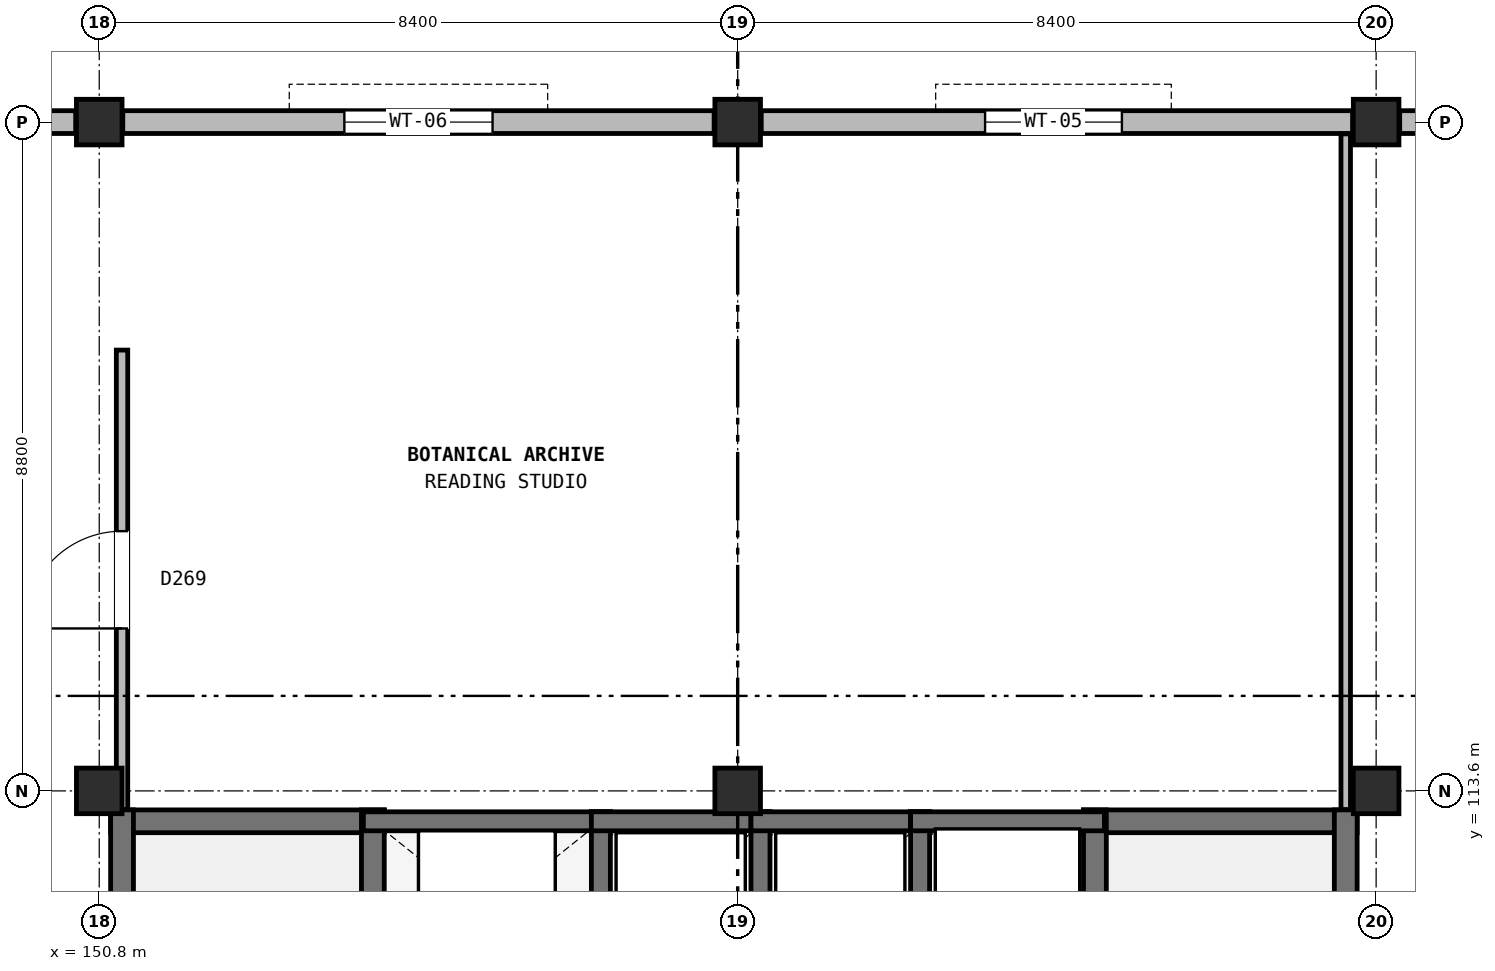
"""IFC4 building model, lengths in metres.
Left out: names, types, materials, properties, quantities, classifications, styles, units other than length and angle.
Written with IfcOpenShell. Run it as: python <this file> out.ifc"""

import sys

from ifc_helpers import new_model, si_unit, direction, frame, frame_2d, origin, origin_2d, place, context, subcontext, project, spatial, rectangle, extrude, element, fill, save


model = new_model("IFC4")
c1 = context("Model", 3, precision=1e-05, world=origin(), true_north=direction((0.0, 1.0)))
c2 = subcontext(c1, "Body", "Model", "MODEL_VIEW")
j1 = project(units=[si_unit("LENGTHUNIT", "METRE"), si_unit("PLANEANGLEUNIT", "RADIAN")], contexts=[c1])
p1 = place(None, origin())
s1 = spatial("IfcSite", under=j1, at=p1, CompositionType="ELEMENT")
p2 = place(p1, origin())
s2 = spatial("IfcBuilding", under=s1, at=p2, CompositionType="ELEMENT")
p3 = place(p2, frame((0.0, 0.0, 52.2)))
s3 = spatial("IfcBuildingStorey", under=s2, at=p3, CompositionType="ELEMENT", Elevation=52.2)
for number, where, z_axis, x_axis in (
    (1, (150.8, 113.6, 0.0), (0.0, 0.0, 1.0), (1.0, 0.0, 0.0)),
    (2, (150.8, 122.4, 0.0), (0.0, 0.0, 1.0), (1.0, 0.0, 0.0)),
    (3, (159.2, 113.6, 0.0), (0.0, 0.0, 1.0), (1.0, 0.0, 0.0)),
    (4, (159.2, 122.4, 0.0), (0.0, 0.0, 1.0), (1.0, 0.0, 0.0)),
    (5, (167.6, 113.6, 0.0), (0.0, 0.0, 1.0), (1.0, 0.0, 0.0)),
    (6, (167.6, 122.4, 0.0), (0.0, 0.0, 1.0), (1.0, 0.0, 0.0)),
):
    element("IfcColumn", number, at=place(p3, frame(where, z_axis=z_axis, x_axis=x_axis)), inside=s3, PredefinedType="COLUMN", context=c2, shape_type="SweptSolid", body=[
        extrude(rectangle(XDim=0.6, YDim=0.6, at=origin_2d()), origin(), (0.0, 0.0, 1.0), 3.8),
    ])
p4 = place(p3, frame((175.69, 122.4, 0.0), z_axis=(0.0, 0.0, 1.0), x_axis=(-1.0, 0.0, 0.0)))
e7 = element("IfcWall", 7, at=p4, inside=s3, PredefinedType="SOLIDWALL", context=c2, shape_type="SweptSolid", body=[
    extrude(rectangle(XDim=7.78, YDim=0.3, at=frame_2d((3.89, 0.0))), origin(), (0.0, 0.0, 1.0), 3.05),
])
p5 = place(p4, frame((1.22, 0.0, 0.9)))
e8 = element("IfcOpeningElement", 8, at=p5, cuts=e7, PredefinedType="OPENING", context=c2, shape_type="SweptSolid", body=[
    extrude(rectangle(XDim=1.65, YDim=1.85, at=frame_2d((0.825, 0.925))), frame((0.0, 0.16, 0.0), z_axis=(0.0, -1.0, 0.0), x_axis=(1.0, 0.0, 0.0)), (0.0, 0.0, 1.0), 0.32),
])
p6 = place(p3, frame((167.29, 122.4, 0.0), z_axis=(0.0, 0.0, 1.0), x_axis=(-1.0, 0.0, 0.0)))
e9 = element("IfcWall", 9, at=p6, inside=s3, PredefinedType="SOLIDWALL", context=c2, shape_type="SweptSolid", body=[
    extrude(rectangle(XDim=7.78, YDim=0.3, at=frame_2d((3.89, 0.0))), origin(), (0.0, 0.0, 1.0), 3.05),
])
p7 = place(p6, frame((3.035, 0.0, 0.9)))
e10 = element("IfcOpeningElement", 10, at=p7, cuts=e9, PredefinedType="OPENING", context=c2, shape_type="SweptSolid", body=[
    extrude(rectangle(XDim=1.8, YDim=1.9, at=frame_2d((0.9, 0.95))), frame((0.0, 0.16, 0.0), z_axis=(0.0, -1.0, 0.0), x_axis=(1.0, 0.0, 0.0)), (0.0, 0.0, 1.0), 0.32),
])
p8 = place(p3, frame((158.89, 122.4, 0.0), z_axis=(0.0, 0.0, 1.0), x_axis=(-1.0, 0.0, 0.0)))
e11 = element("IfcWall", 11, at=p8, inside=s3, PredefinedType="SOLIDWALL", context=c2, shape_type="SweptSolid", body=[
    extrude(rectangle(XDim=7.78, YDim=0.3, at=frame_2d((3.89, 0.0))), origin(), (0.0, 0.0, 1.0), 3.05),
])
p9 = place(p8, frame((2.915, 0.0, 0.9)))
e12 = element("IfcOpeningElement", 12, at=p9, cuts=e11, PredefinedType="OPENING", context=c2, shape_type="SweptSolid", body=[
    extrude(rectangle(XDim=1.95, YDim=1.9, at=frame_2d((0.975, 0.95))), frame((0.0, 0.16, 0.0), z_axis=(0.0, -1.0, 0.0), x_axis=(1.0, 0.0, 0.0)), (0.0, 0.0, 1.0), 0.32),
])
p10 = place(p3, frame((150.49, 122.4, 0.0), z_axis=(0.0, 0.0, 1.0), x_axis=(-1.0, 0.0, 0.0)))
e13 = element("IfcWall", 13, at=p10, inside=s3, PredefinedType="SOLIDWALL", context=c2, shape_type="SweptSolid", body=[
    extrude(rectangle(XDim=7.78, YDim=0.3, at=frame_2d((3.89, 0.0))), origin(), (0.0, 0.0, 1.0), 3.05),
])
p11 = place(p10, frame((2.84, 0.0, 0.9)))
e14 = element("IfcOpeningElement", 14, at=p11, cuts=e13, PredefinedType="OPENING", context=c2, shape_type="SweptSolid", body=[
    extrude(rectangle(XDim=2.1, YDim=1.95, at=frame_2d((1.05, 0.975))), frame((0.0, 0.16, 0.0), z_axis=(0.0, -1.0, 0.0), x_axis=(1.0, 0.0, 0.0)), (0.0, 0.0, 1.0), 0.32),
])
p12 = place(p3, frame((150.95, 113.2, 0.0), z_axis=(0.0, 0.0, 1.0), x_axis=(1.0, 0.0, 0.0)))
e15 = element("IfcWall", 15, at=p12, inside=s3, PredefinedType="SHEAR", context=c2, shape_type="SweptSolid", body=[
    extrude(rectangle(XDim=3.6, YDim=0.3, at=frame_2d((1.8, 0.0))), origin(), (0.0, 0.0, 1.0), 3.8),
])
p13 = place(p3, frame((151.1, 105.05, 0.0), z_axis=(0.0, 0.0, 1.0), x_axis=(0.0, 1.0, 0.0)))
e16 = element("IfcWall", 16, at=p13, inside=s3, PredefinedType="SHEAR", context=c2, shape_type="SweptSolid", body=[
    extrude(rectangle(XDim=8.3, YDim=0.3, at=frame_2d((4.15, 0.0))), origin(), (0.0, 0.0, 1.0), 3.8),
])
p14 = place(p3, frame((154.4, 105.05, 0.0), z_axis=(0.0, 0.0, 1.0), x_axis=(0.0, 1.0, 0.0)))
e17 = element("IfcWall", 17, at=p14, inside=s3, PredefinedType="SHEAR", context=c2, shape_type="SweptSolid", body=[
    extrude(rectangle(XDim=8.3, YDim=0.3, at=frame_2d((4.15, 0.0))), origin(), (0.0, 0.0, 1.0), 3.8),
])
p15 = place(p14, frame((0.45, 0.0, 0.0)))
e18 = element("IfcOpeningElement", 18, at=p15, cuts=e17, PredefinedType="OPENING", context=c2, shape_type="SweptSolid", body=[
    extrude(rectangle(XDim=1.1, YDim=2.2, at=frame_2d((0.55, 1.1))), frame((0.0, 0.16, 0.0), z_axis=(0.0, -1.0, 0.0), x_axis=(1.0, 0.0, 0.0)), (0.0, 0.0, 1.0), 0.32),
])
p16 = place(p3, frame((163.75, 113.2, 0.0), z_axis=(0.0, 0.0, 1.0), x_axis=(1.0, 0.0, 0.0)))
e19 = element("IfcWall", 19, at=p16, inside=s3, PredefinedType="SHEAR", context=c2, shape_type="SweptSolid", body=[
    extrude(rectangle(XDim=3.6, YDim=0.3, at=frame_2d((1.8, 0.0))), origin(), (0.0, 0.0, 1.0), 3.8),
])
for number, where, z_axis, x_axis in (
    (20, (163.9, 105.05, 0.0), (0.0, 0.0, 1.0), (0.0, 1.0, 0.0)),
    (21, (167.2, 105.05, 0.0), (0.0, 0.0, 1.0), (0.0, 1.0, 0.0)),
):
    element("IfcWall", number, at=place(p3, frame(where, z_axis=z_axis, x_axis=x_axis)), inside=s3, PredefinedType="SHEAR", context=c2, shape_type="SweptSolid", body=[
        extrude(rectangle(XDim=8.3, YDim=0.3, at=frame_2d((4.15, 0.0))), origin(), (0.0, 0.0, 1.0), 3.8),
    ])
p17 = place(p3, frame((154.275, 113.2, 0.0), z_axis=(0.0, 0.0, 1.0), x_axis=(1.0, 0.0, 0.0)))
e22 = element("IfcWall", 22, at=p17, inside=s3, PredefinedType="SOLIDWALL", context=c2, shape_type="SweptSolid", body=[
    extrude(rectangle(XDim=3.25, YDim=0.25, at=frame_2d((1.625, 0.0))), origin(), (0.0, 0.0, 1.0), 3.48),
])
p18 = place(p3, frame((157.4, 110.675, 0.0), z_axis=(0.0, 0.0, 1.0), x_axis=(0.0, 1.0, 0.0)))
e23 = element("IfcWall", 23, at=p18, inside=s3, PredefinedType="SOLIDWALL", context=c2, shape_type="SweptSolid", body=[
    extrude(rectangle(XDim=2.65, YDim=0.25, at=frame_2d((1.325, 0.0))), origin(), (0.0, 0.0, 1.0), 3.48),
])
p19 = place(p3, frame((157.275, 113.2, 0.0), z_axis=(0.0, 0.0, 1.0), x_axis=(1.0, 0.0, 0.0)))
e24 = element("IfcWall", 24, at=p19, inside=s3, PredefinedType="SOLIDWALL", context=c2, shape_type="SweptSolid", body=[
    extrude(rectangle(XDim=2.35, YDim=0.25, at=frame_2d((1.175, 0.0))), origin(), (0.0, 0.0, 1.0), 3.48),
])
p20 = place(p3, frame((159.5, 110.675, 0.0), z_axis=(0.0, 0.0, 1.0), x_axis=(0.0, 1.0, 0.0)))
e25 = element("IfcWall", 25, at=p20, inside=s3, PredefinedType="SOLIDWALL", context=c2, shape_type="SweptSolid", body=[
    extrude(rectangle(XDim=2.65, YDim=0.25, at=frame_2d((1.325, 0.0))), origin(), (0.0, 0.0, 1.0), 3.48),
])
p21 = place(p3, frame((159.375, 113.2, 0.0), z_axis=(0.0, 0.0, 1.0), x_axis=(1.0, 0.0, 0.0)))
e26 = element("IfcWall", 26, at=p21, inside=s3, PredefinedType="SOLIDWALL", context=c2, shape_type="SweptSolid", body=[
    extrude(rectangle(XDim=2.35, YDim=0.25, at=frame_2d((1.175, 0.0))), origin(), (0.0, 0.0, 1.0), 3.48),
])
p22 = place(p3, frame((161.6, 110.675, 0.0), z_axis=(0.0, 0.0, 1.0), x_axis=(0.0, 1.0, 0.0)))
e27 = element("IfcWall", 27, at=p22, inside=s3, PredefinedType="SOLIDWALL", context=c2, shape_type="SweptSolid", body=[
    extrude(rectangle(XDim=2.65, YDim=0.25, at=frame_2d((1.325, 0.0))), origin(), (0.0, 0.0, 1.0), 3.48),
])
p23 = place(p3, frame((161.475, 113.2, 0.0), z_axis=(0.0, 0.0, 1.0), x_axis=(1.0, 0.0, 0.0)))
e28 = element("IfcWall", 28, at=p23, inside=s3, PredefinedType="SOLIDWALL", context=c2, shape_type="SweptSolid", body=[
    extrude(rectangle(XDim=2.55, YDim=0.25, at=frame_2d((1.275, 0.0))), origin(), (0.0, 0.0, 1.0), 3.48),
])
p24 = place(p3, frame((151.1, 113.355, 0.0), z_axis=(0.0, 0.0, 1.0), x_axis=(0.0, 1.0, 0.0)))
e29 = element("IfcWall", 29, at=p24, inside=s3, PredefinedType="PARTITIONING", context=c2, shape_type="SweptSolid", body=[
    extrude(rectangle(XDim=6.045, YDim=0.15, at=frame_2d((3.022, 0.0))), origin(), (0.0, 0.0, 1.0), 3.045),
])
p25 = place(p24, frame((2.383, 0.0, 0.0)))
e30 = element("IfcOpeningElement", 30, at=p25, cuts=e29, PredefinedType="OPENING", context=c2, shape_type="SweptSolid", body=[
    extrude(rectangle(XDim=1.28, YDim=2.25, at=frame_2d((0.64, 1.125))), frame((0.0, 0.085, 0.0), z_axis=(0.0, -1.0, 0.0), x_axis=(1.0, 0.0, 0.0)), (0.0, 0.0, 1.0), 0.17),
])
p26 = place(p3, frame((167.2, 113.355, 0.0), z_axis=(0.0, 0.0, 1.0), x_axis=(0.0, 1.0, 0.0)))
e31 = element("IfcWall", 31, at=p26, inside=s3, PredefinedType="PARTITIONING", context=c2, shape_type="SweptSolid", body=[
    extrude(rectangle(XDim=8.89, YDim=0.125, at=frame_2d((4.445, 0.0))), origin(), (0.0, 0.0, 1.0), 3.045),
])
p27 = place(p7, origin())
e32 = element("IfcWindow", 32, at=p27, inside=s3, PartitioningType="SINGLE_PANEL", PredefinedType="WINDOW", context=c2, shape_type="SweptSolid", body=[
    extrude(rectangle(XDim=1.8, YDim=1.9, at=frame_2d((0.9, 0.95))), frame((0.0, 0.03, 0.0), z_axis=(0.0, -1.0, 0.0), x_axis=(1.0, 0.0, 0.0)), (0.0, 0.0, 1.0), 0.06),
])
fill(e10, e32)
p28 = place(p9, origin())
e33 = element("IfcWindow", 33, at=p28, inside=s3, PartitioningType="SINGLE_PANEL", PredefinedType="WINDOW", context=c2, shape_type="SweptSolid", body=[
    extrude(rectangle(XDim=1.95, YDim=1.9, at=frame_2d((0.975, 0.95))), frame((0.0, 0.03, 0.0), z_axis=(0.0, -1.0, 0.0), x_axis=(1.0, 0.0, 0.0)), (0.0, 0.0, 1.0), 0.06),
])
fill(e12, e33)
p29 = place(p25, origin())
e34 = element("IfcDoor", 34, at=p29, inside=s3, OperationType="SINGLE_SWING_LEFT", PredefinedType="DOOR", context=c2, shape_type="SweptSolid", body=[
    extrude(rectangle(XDim=1.28, YDim=2.25, at=frame_2d((0.64, 1.125))), frame((0.0, 0.025, 0.0), z_axis=(0.0, -1.0, 0.0), x_axis=(1.0, 0.0, 0.0)), (0.0, 0.0, 1.0), 0.05),
])
fill(e30, e34)
save(model, sys.argv[1])
